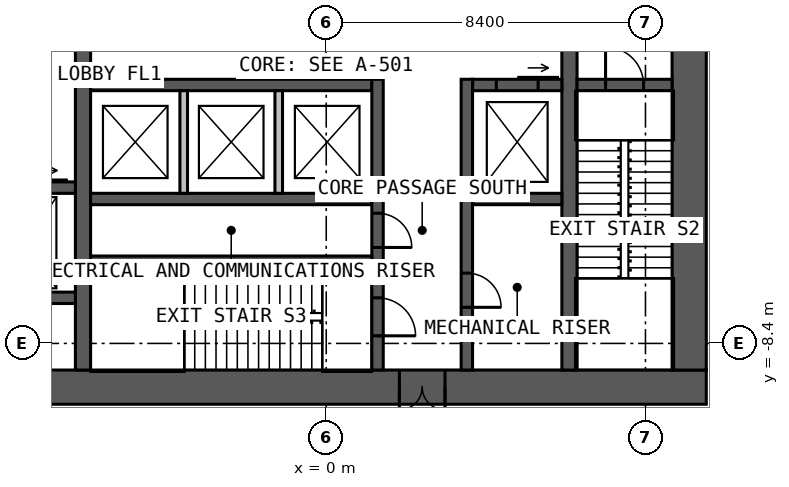
"""IFC4 building model, lengths in metres.
Left out: names, types, materials, properties, quantities, classifications, styles, units other than length and angle.
Written with IfcOpenShell. Run it as: python <this file> out.ifc"""

import sys

from ifc_helpers import new_model, si_unit, direction, frame, frame_2d, origin, place, context, subcontext, project, spatial, rectangle, extrude, element, fill, save


model = new_model("IFC4")
c1 = context("Model", 3, precision=1e-05, world=origin(), true_north=direction((0.0, 1.0)))
c2 = subcontext(c1, "Body", "Model", "MODEL_VIEW")
j1 = project(units=[si_unit("LENGTHUNIT", "METRE"), si_unit("PLANEANGLEUNIT", "RADIAN")], contexts=[c1])
p1 = place(None, origin())
s1 = spatial("IfcSite", under=j1, at=p1, CompositionType="ELEMENT")
p2 = place(p1, origin())
s2 = spatial("IfcBuilding", under=s1, at=p2, CompositionType="ELEMENT")
p3 = place(p2, frame((0.0, 0.0, 11.0)))
s3 = spatial("IfcBuildingStorey", under=s2, at=p3, CompositionType="ELEMENT", Elevation=11.0)
p4 = place(p3, frame((10.0, -9.55, 0.0), z_axis=(0.0, 0.0, 1.0), x_axis=(-1.0, 0.0, 0.0)))
e1 = element("IfcWall", 1, at=p4, inside=s3, PredefinedType="SOLIDWALL", context=c2, shape_type="SweptSolid", body=[
    extrude(rectangle(XDim=20.0, YDim=0.9, at=frame_2d((10.0, 0.0))), origin(), (0.0, 0.0, 1.0), 5.0),
])
p5 = place(p4, frame((6.875, 0.0, 0.0)))
e2 = element("IfcOpeningElement", 2, at=p5, cuts=e1, PredefinedType="OPENING", context=c2, shape_type="SweptSolid", body=[
    extrude(rectangle(XDim=1.2, YDim=2.2, at=frame_2d((0.6, 1.1))), frame((0.0, 0.46, 0.0), z_axis=(0.0, -1.0, 0.0), x_axis=(1.0, 0.0, 0.0)), (0.0, 0.0, 1.0), 0.92),
])
p6 = place(p3, frame((9.55, -9.1, 0.0), z_axis=(0.0, 0.0, 1.0), x_axis=(0.0, 1.0, 0.0)))
e3 = element("IfcWall", 3, at=p6, inside=s3, PredefinedType="SOLIDWALL", context=c2, shape_type="SweptSolid", body=[
    extrude(rectangle(XDim=18.2, YDim=0.9, at=frame_2d((9.1, 0.0))), origin(), (0.0, 0.0, 1.0), 5.0),
])
p7 = place(p3, frame((-6.4, -9.1, 0.0), z_axis=(0.0, 0.0, 1.0), x_axis=(0.0, 1.0, 0.0)))
e4 = element("IfcWall", 4, at=p7, inside=s3, PredefinedType="SOLIDWALL", context=c2, shape_type="SweptSolid", body=[
    extrude(rectangle(XDim=18.2, YDim=0.4, at=frame_2d((9.1, 0.0))), origin(), (0.0, 0.0, 1.0), 5.0),
])
p8 = place(p7, frame((8.6, 0.0, 0.0)))
e5 = element("IfcOpeningElement", 5, at=p8, cuts=e4, PredefinedType="OPENING", context=c2, shape_type="SweptSolid", body=[
    extrude(rectangle(XDim=1.0, YDim=2.2, at=frame_2d((0.5, 1.1))), frame((0.0, 0.21, 0.0), z_axis=(0.0, -1.0, 0.0), x_axis=(1.0, 0.0, 0.0)), (0.0, 0.0, 1.0), 0.42),
])
p9 = place(p3, frame((6.4, 9.1, 0.0), z_axis=(0.0, 0.0, 1.0), x_axis=(0.0, -1.0, 0.0)))
e6 = element("IfcWall", 6, at=p9, inside=s3, PredefinedType="SOLIDWALL", context=c2, shape_type="SweptSolid", body=[
    extrude(rectangle(XDim=18.2, YDim=0.4, at=frame_2d((9.1, 0.0))), origin(), (0.0, 0.0, 1.0), 5.0),
])
p10 = place(p9, frame((8.6, 0.0, 0.0)))
e7 = element("IfcOpeningElement", 7, at=p10, cuts=e6, PredefinedType="OPENING", context=c2, shape_type="SweptSolid", body=[
    extrude(rectangle(XDim=1.0, YDim=2.2, at=frame_2d((0.5, 1.1))), frame((0.0, 0.21, 0.0), z_axis=(0.0, -1.0, 0.0), x_axis=(1.0, 0.0, 0.0)), (0.0, 0.0, 1.0), 0.42),
])
p11 = place(p3, frame((-6.2, -1.6, 0.0), z_axis=(0.0, 0.0, 1.0), x_axis=(1.0, 0.0, 0.0)))
e8 = element("IfcWall", 8, at=p11, inside=s3, PredefinedType="SOLIDWALL", context=c2, shape_type="SweptSolid", body=[
    extrude(rectangle(XDim=7.4, YDim=0.3, at=frame_2d((3.7, 0.0))), origin(), (0.0, 0.0, 1.0), 5.0),
])
p12 = place(p3, frame((3.85, -1.6, 0.0), z_axis=(0.0, 0.0, 1.0), x_axis=(1.0, 0.0, 0.0)))
e9 = element("IfcWall", 9, at=p12, inside=s3, PredefinedType="SOLIDWALL", context=c2, shape_type="SweptSolid", body=[
    extrude(rectangle(XDim=2.35, YDim=0.3, at=frame_2d((1.175, 0.0))), origin(), (0.0, 0.0, 1.0), 5.0),
])
p13 = place(p12, frame((0.625, 0.0, 0.0)))
e10 = element("IfcOpeningElement", 10, at=p13, cuts=e9, PredefinedType="OPENING", context=c2, shape_type="SweptSolid", body=[
    extrude(rectangle(XDim=1.1, YDim=2.2, at=frame_2d((0.55, 1.1))), frame((0.0, 0.16, 0.0), z_axis=(0.0, -1.0, 0.0), x_axis=(1.0, 0.0, 0.0)), (0.0, 0.0, 1.0), 0.32),
])
p14 = place(p3, frame((-6.2, -4.6, 0.0), z_axis=(0.0, 0.0, 1.0), x_axis=(1.0, 0.0, 0.0)))
e11 = element("IfcWall", 11, at=p14, inside=s3, PredefinedType="SOLIDWALL", context=c2, shape_type="SweptSolid", body=[
    extrude(rectangle(XDim=7.4, YDim=0.3, at=frame_2d((3.7, 0.0))), origin(), (0.0, 0.0, 1.0), 5.0),
])
p15 = place(p3, frame((3.85, -4.6, 0.0), z_axis=(0.0, 0.0, 1.0), x_axis=(1.0, 0.0, 0.0)))
e12 = element("IfcWall", 12, at=p15, inside=s3, PredefinedType="SOLIDWALL", context=c2, shape_type="SweptSolid", body=[
    extrude(rectangle(XDim=2.35, YDim=0.3, at=frame_2d((1.175, 0.0))), origin(), (0.0, 0.0, 1.0), 5.0),
])
p16 = place(p3, frame((1.35, -1.45, 0.0), z_axis=(0.0, 0.0, 1.0), x_axis=(0.0, -1.0, 0.0)))
e13 = element("IfcWall", 13, at=p16, inside=s3, PredefinedType="SOLIDWALL", context=c2, shape_type="SweptSolid", body=[
    extrude(rectangle(XDim=7.65, YDim=0.3, at=frame_2d((3.825, 0.0))), origin(), (0.0, 0.0, 1.0), 5.0),
])
p17 = place(p16, frame((5.75, 0.0, 0.0)))
e14 = element("IfcOpeningElement", 14, at=p17, cuts=e13, PredefinedType="OPENING", context=c2, shape_type="SweptSolid", body=[
    extrude(rectangle(XDim=1.0, YDim=2.2, at=frame_2d((0.5, 1.1))), frame((0.0, 0.16, 0.0), z_axis=(0.0, -1.0, 0.0), x_axis=(1.0, 0.0, 0.0)), (0.0, 0.0, 1.0), 0.32),
])
p18 = place(p16, frame((3.525, 0.0, 0.0)))
e15 = element("IfcOpeningElement", 15, at=p18, cuts=e13, PredefinedType="OPENING", context=c2, shape_type="SweptSolid", body=[
    extrude(rectangle(XDim=0.9, YDim=2.2, at=frame_2d((0.45, 1.1))), frame((0.0, 0.16, 0.0), z_axis=(0.0, -1.0, 0.0), x_axis=(1.0, 0.0, 0.0)), (0.0, 0.0, 1.0), 0.32),
])
p19 = place(p3, frame((3.7, -1.45, 0.0), z_axis=(0.0, 0.0, 1.0), x_axis=(0.0, -1.0, 0.0)))
e16 = element("IfcWall", 16, at=p19, inside=s3, PredefinedType="SOLIDWALL", context=c2, shape_type="SweptSolid", body=[
    extrude(rectangle(XDim=7.65, YDim=0.3, at=frame_2d((3.825, 0.0))), origin(), (0.0, 0.0, 1.0), 5.0),
])
p20 = place(p19, frame((5.1, 0.0, 0.0)))
e17 = element("IfcOpeningElement", 17, at=p20, cuts=e16, PredefinedType="OPENING", context=c2, shape_type="SweptSolid", body=[
    extrude(rectangle(XDim=0.9, YDim=2.2, at=frame_2d((0.45, 1.1))), frame((0.0, 0.16, 0.0), z_axis=(0.0, -1.0, 0.0), x_axis=(1.0, 0.0, 0.0)), (0.0, 0.0, 1.0), 0.32),
])
p21 = place(p3, frame((-6.2, -6.2, 0.0), z_axis=(0.0, 0.0, 1.0), x_axis=(1.0, 0.0, 0.0)))
e18 = element("IfcWall", 18, at=p21, inside=s3, PredefinedType="SOLIDWALL", context=c2, shape_type="SweptSolid", body=[
    extrude(rectangle(XDim=7.4, YDim=0.2, at=frame_2d((3.7, 0.0))), origin(), (0.0, 0.0, 1.0), 5.0),
])
p22 = place(p3, frame((6.6, -1.6, 0.0), z_axis=(0.0, 0.0, 1.0), x_axis=(1.0, 0.0, 0.0)))
e19 = element("IfcWall", 19, at=p22, inside=s3, PredefinedType="SOLIDWALL", context=c2, shape_type="SweptSolid", body=[
    extrude(rectangle(XDim=2.5, YDim=0.3, at=frame_2d((1.25, 0.0))), origin(), (0.0, 0.0, 1.0), 5.0),
])
p23 = place(p22, frame((0.75, 0.0, 0.0)))
e20 = element("IfcOpeningElement", 20, at=p23, cuts=e19, PredefinedType="OPENING", context=c2, shape_type="SweptSolid", body=[
    extrude(rectangle(XDim=1.0, YDim=2.2, at=frame_2d((0.5, 1.1))), frame((0.0, 0.16, 0.0), z_axis=(0.0, -1.0, 0.0), x_axis=(1.0, 0.0, 0.0)), (0.0, 0.0, 1.0), 0.32),
])
p24 = place(p3, frame((-9.1, -4.3, 0.0), z_axis=(0.0, 0.0, 1.0), x_axis=(1.0, 0.0, 0.0)))
e21 = element("IfcWall", 21, at=p24, inside=s3, PredefinedType="SOLIDWALL", context=c2, shape_type="SweptSolid", body=[
    extrude(rectangle(XDim=2.5, YDim=0.3, at=frame_2d((1.25, 0.0))), origin(), (0.0, 0.0, 1.0), 5.0),
])
p25 = place(p24, frame((0.65, 0.0, 0.0)))
e22 = element("IfcOpeningElement", 22, at=p25, cuts=e21, PredefinedType="OPENING", context=c2, shape_type="SweptSolid", body=[
    extrude(rectangle(XDim=1.1, YDim=2.2, at=frame_2d((0.55, 1.1))), frame((0.0, 0.16, 0.0), z_axis=(0.0, -1.0, 0.0), x_axis=(1.0, 0.0, 0.0)), (0.0, 0.0, 1.0), 0.32),
])
p26 = place(p3, frame((-9.1, -7.2, 0.0), z_axis=(0.0, 0.0, 1.0), x_axis=(1.0, 0.0, 0.0)))
e23 = element("IfcWall", 23, at=p26, inside=s3, PredefinedType="SOLIDWALL", context=c2, shape_type="SweptSolid", body=[
    extrude(rectangle(XDim=2.5, YDim=0.3, at=frame_2d((1.25, 0.0))), origin(), (0.0, 0.0, 1.0), 5.0),
])
for number, where, z_axis, x_axis in (
    (24, (-3.75, -1.75, 0.0), (0.0, 0.0, 1.0), (0.0, -1.0, 0.0)),
    (25, (-1.25, -1.75, 0.0), (0.0, 0.0, 1.0), (0.0, -1.0, 0.0)),
):
    element("IfcWall", number, at=place(p3, frame(where, z_axis=z_axis, x_axis=x_axis)), inside=s3, PredefinedType="SOLIDWALL", context=c2, shape_type="SweptSolid", body=[
        extrude(rectangle(XDim=2.7, YDim=0.2, at=frame_2d((1.35, 0.0))), origin(), (0.0, 0.0, 1.0), 4.75),
    ])
p27 = place(p5, origin())
e26 = element("IfcDoor", 26, at=p27, inside=s3, OperationType="DOUBLE_DOOR_SINGLE_SWING", PredefinedType="DOOR", context=c2, shape_type="SweptSolid", body=[
    extrude(rectangle(XDim=1.2, YDim=2.2, at=frame_2d((0.6, 1.1))), frame((0.0, 0.025, 0.0), z_axis=(0.0, -1.0, 0.0), x_axis=(1.0, 0.0, 0.0)), (0.0, 0.0, 1.0), 0.05),
])
fill(e2, e26)
p28 = place(p23, origin())
e27 = element("IfcDoor", 27, at=p28, inside=s3, OperationType="SINGLE_SWING_LEFT", PredefinedType="DOOR", context=c2, shape_type="SweptSolid", body=[
    extrude(rectangle(XDim=1.0, YDim=2.2, at=frame_2d((0.5, 1.1))), frame((0.0, 0.025, 0.0), z_axis=(0.0, -1.0, 0.0), x_axis=(1.0, 0.0, 0.0)), (0.0, 0.0, 1.0), 0.05),
])
fill(e20, e27)
p29 = place(p17, origin())
e28 = element("IfcDoor", 28, at=p29, inside=s3, OperationType="SINGLE_SWING_RIGHT", PredefinedType="DOOR", context=c2, shape_type="SweptSolid", body=[
    extrude(rectangle(XDim=1.0, YDim=2.2, at=frame_2d((0.5, 1.1))), frame((0.0, 0.025, 0.0), z_axis=(0.0, -1.0, 0.0), x_axis=(1.0, 0.0, 0.0)), (0.0, 0.0, 1.0), 0.05),
])
fill(e14, e28)
p30 = place(p18, origin())
e29 = element("IfcDoor", 29, at=p30, inside=s3, OperationType="SINGLE_SWING_RIGHT", PredefinedType="DOOR", context=c2, shape_type="SweptSolid", body=[
    extrude(rectangle(XDim=0.9, YDim=2.2, at=frame_2d((0.45, 1.1))), frame((0.0, 0.025, 0.0), z_axis=(0.0, -1.0, 0.0), x_axis=(1.0, 0.0, 0.0)), (0.0, 0.0, 1.0), 0.05),
])
fill(e15, e29)
p31 = place(p20, origin())
e30 = element("IfcDoor", 30, at=p31, inside=s3, OperationType="SINGLE_SWING_RIGHT", PredefinedType="DOOR", context=c2, shape_type="SweptSolid", body=[
    extrude(rectangle(XDim=0.9, YDim=2.2, at=frame_2d((0.45, 1.1))), frame((0.0, 0.025, 0.0), z_axis=(0.0, -1.0, 0.0), x_axis=(1.0, 0.0, 0.0)), (0.0, 0.0, 1.0), 0.05),
])
fill(e17, e30)
p32 = place(p13, origin())
e31 = element("IfcDoor", 31, at=p32, inside=s3, OperationType="SLIDING_TO_LEFT", PredefinedType="DOOR", context=c2, shape_type="SweptSolid", body=[
    extrude(rectangle(XDim=1.1, YDim=2.2, at=frame_2d((0.55, 1.1))), frame((0.0, 0.025, 0.0), z_axis=(0.0, -1.0, 0.0), x_axis=(1.0, 0.0, 0.0)), (0.0, 0.0, 1.0), 0.05),
])
fill(e10, e31)
save(model, sys.argv[1])
